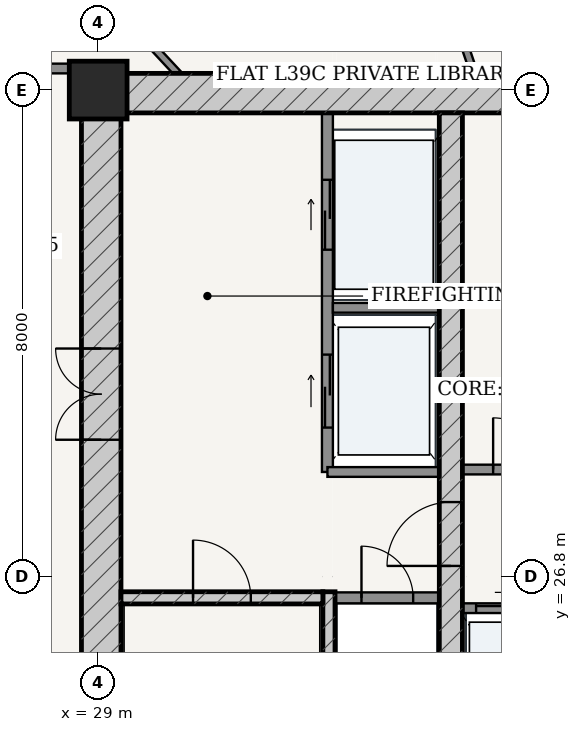
"""IFC4 building model, lengths in metres.
Left out: names, types, materials, properties, quantities, classifications, styles, units other than length and angle.
Written with IfcOpenShell. Run it as: python <this file> out.ifc"""

import sys

from ifc_helpers import new_model, si_unit, direction, frame, frame_2d, origin, origin_2d, place, context, subcontext, project, spatial, rectangle, extrude, source, transform, mapped, element, fill, save


model = new_model("IFC4")
c1 = context("Model", 3, precision=1e-05, world=origin(), true_north=direction((-0.2419218956, 0.970295726276)))
c2 = subcontext(c1, "Body", "Model", "MODEL_VIEW")
j1 = project(units=[si_unit("LENGTHUNIT", "METRE"), si_unit("PLANEANGLEUNIT", "RADIAN")], contexts=[c1])
p1 = place(None, origin())
s1 = spatial("IfcSite", under=j1, at=p1, CompositionType="ELEMENT")
p2 = place(p1, origin())
s2 = spatial("IfcBuilding", under=s1, at=p2, CompositionType="ELEMENT")
p3 = place(p2, frame((0.0, 0.0, 149.8)))
s3 = spatial("IfcBuildingStorey", under=s2, at=p3, CompositionType="ELEMENT", Elevation=149.8)
p4 = place(p3, frame((29.0, 34.8, 0.0), z_axis=(0.0, 0.0, 1.0), x_axis=(1.0, 0.0, 0.0)))
e1 = element("IfcColumn", 1, at=p4, inside=s3, PredefinedType="COLUMN", context=c2, shape_type="SweptSolid", body=[
    extrude(rectangle(XDim=0.95, YDim=0.95, at=origin_2d()), origin(), (0.0, 0.0, 1.0), 3.6),
])
p5 = place(p3, frame((28.725, 34.75, 0.0), z_axis=(0.0, 0.0, 1.0), x_axis=(1.0, 0.0, 0.0)))
e2 = element("IfcWall", 2, at=p5, inside=s3, PredefinedType="SHEAR", context=c2, shape_type="SweptSolid", body=[
    extrude(rectangle(XDim=18.55, YDim=0.65, at=frame_2d((9.275, 0.0))), origin(), (0.0, 0.0, 1.0), 3.33),
])
p6 = place(p3, frame((29.05, 19.175, 0.0), z_axis=(0.0, 0.0, 1.0), x_axis=(0.0, 1.0, 0.0)))
e3 = element("IfcWall", 3, at=p6, inside=s3, PredefinedType="SHEAR", context=c2, shape_type="SweptSolid", body=[
    extrude(rectangle(XDim=15.25, YDim=0.65, at=frame_2d((7.625, 0.0))), origin(), (0.0, 0.0, 1.0), 3.33),
])
p7 = place(p6, frame((9.875, 0.0, 0.0)))
e4 = element("IfcOpeningElement", 4, at=p7, cuts=e3, PredefinedType="OPENING", context=c2, shape_type="SweptSolid", body=[
    extrude(rectangle(XDim=1.5, YDim=2.2, at=frame_2d((0.75, 1.1))), frame((0.0, 0.335, 0.0), z_axis=(0.0, -1.0, 0.0), x_axis=(1.0, 0.0, 0.0)), (0.0, 0.0, 1.0), 0.67),
])
p8 = place(p3, frame((32.795, 19.175, 0.0), z_axis=(0.0, 0.0, 1.0), x_axis=(0.0, 1.0, 0.0)))
e5 = element("IfcWall", 5, at=p8, inside=s3, PredefinedType="SOLIDWALL", context=c2, shape_type="SweptSolid", body=[
    extrude(rectangle(XDim=7.375, YDim=0.2, at=frame_2d((3.688, 0.0))), origin(), (0.0, 0.0, 1.0), 3.33),
])
p9 = place(p3, frame((29.375, 26.45, 0.0), z_axis=(0.0, 0.0, 1.0), x_axis=(1.0, 0.0, 0.0)))
e6 = element("IfcWall", 6, at=p9, inside=s3, PredefinedType="SOLIDWALL", context=c2, shape_type="SweptSolid", body=[
    extrude(rectangle(XDim=3.32, YDim=0.2, at=frame_2d((1.66, 0.0))), origin(), (0.0, 0.0, 1.0), 3.33),
])
p10 = place(p9, frame((1.185, 0.0, 0.0)))
e7 = element("IfcOpeningElement", 7, at=p10, cuts=e6, PredefinedType="OPENING", context=c2, shape_type="SweptSolid", body=[
    extrude(rectangle(XDim=0.95, YDim=2.15, at=frame_2d((0.475, 1.075))), frame((0.0, 0.11, 0.0), z_axis=(0.0, -1.0, 0.0), x_axis=(1.0, 0.0, 0.0)), (0.0, 0.0, 1.0), 0.22),
])
p11 = place(p3, frame((34.8, 19.175, 0.0), z_axis=(0.0, 0.0, 1.0), x_axis=(0.0, 1.0, 0.0)))
e8 = element("IfcWall", 8, at=p11, inside=s3, PredefinedType="SHEAR", context=c2, shape_type="SweptSolid", body=[
    extrude(rectangle(XDim=15.25, YDim=0.38, at=frame_2d((7.625, 0.0))), origin(), (0.0, 0.0, 1.0), 3.33),
])
p12 = place(p11, frame((7.8, 0.0, 0.0)))
e9 = element("IfcOpeningElement", 9, at=p12, cuts=e8, PredefinedType="OPENING", context=c2, shape_type="SweptSolid", body=[
    extrude(rectangle(XDim=1.05, YDim=2.15, at=frame_2d((0.525, 1.075))), frame((0.0, 0.2, 0.0), z_axis=(0.0, -1.0, 0.0), x_axis=(1.0, 0.0, 0.0)), (0.0, 0.0, 1.0), 0.4),
])
p13 = place(p3, frame((32.9, 26.45, 0.0), z_axis=(0.0, 0.0, 1.0), x_axis=(1.0, 0.0, 0.0)))
e10 = element("IfcWall", 10, at=p13, inside=s3, PredefinedType="PARTITIONING", context=c2, shape_type="SweptSolid", body=[
    extrude(rectangle(XDim=1.71, YDim=0.18, at=frame_2d((0.855, 0.0))), origin(), (0.0, 0.0, 1.0), 3.33),
])
p14 = place(p13, frame((0.43, 0.0, 0.0)))
e11 = element("IfcOpeningElement", 11, at=p14, cuts=e10, PredefinedType="OPENING", context=c2, shape_type="SweptSolid", body=[
    extrude(rectangle(XDim=0.85, YDim=2.1, at=frame_2d((0.425, 1.05))), frame((0.0, 0.1, 0.0), z_axis=(0.0, -1.0, 0.0), x_axis=(1.0, 0.0, 0.0)), (0.0, 0.0, 1.0), 0.2),
])
p15 = place(p3, frame((32.77, 28.52, 0.0), z_axis=(0.0, 0.0, 1.0), x_axis=(0.0, 1.0, 0.0)))
e12 = element("IfcWall", 12, at=p15, inside=s3, PredefinedType="PARTITIONING", context=c2, shape_type="SweptSolid", body=[
    extrude(rectangle(XDim=5.905, YDim=0.18, at=frame_2d((2.953, 0.0))), origin(), (0.0, 0.0, 1.0), 3.33),
])
p16 = place(p15, frame((3.655, 0.0, 0.0)))
e13 = element("IfcOpeningElement", 13, at=p16, cuts=e12, PredefinedType="OPENING", context=c2, shape_type="SweptSolid", body=[
    extrude(rectangle(XDim=1.15, YDim=2.2, at=frame_2d((0.575, 1.1))), frame((0.0, 0.1, 0.0), z_axis=(0.0, -1.0, 0.0), x_axis=(1.0, 0.0, 0.0)), (0.0, 0.0, 1.0), 0.2),
])
p17 = place(p15, frame((0.73, 0.0, 0.0)))
e14 = element("IfcOpeningElement", 14, at=p17, cuts=e12, PredefinedType="OPENING", context=c2, shape_type="SweptSolid", body=[
    extrude(rectangle(XDim=1.2, YDim=2.25, at=frame_2d((0.6, 1.125))), frame((0.0, 0.1, 0.0), z_axis=(0.0, -1.0, 0.0), x_axis=(1.0, 0.0, 0.0)), (0.0, 0.0, 1.0), 0.2),
])
p18 = place(p3, frame((32.86, 31.22, 0.0), z_axis=(0.0, 0.0, 1.0), x_axis=(1.0, 0.0, 0.0)))
e15 = element("IfcWall", 15, at=p18, inside=s3, PredefinedType="PARTITIONING", context=c2, shape_type="SweptSolid", body=[
    extrude(rectangle(XDim=1.75, YDim=0.16, at=frame_2d((0.875, 0.0))), origin(), (0.0, 0.0, 1.0), 3.33),
])
p19 = place(p3, frame((32.77, 28.52, 0.0), z_axis=(0.0, 0.0, 1.0), x_axis=(1.0, 0.0, 0.0)))
e16 = element("IfcWall", 16, at=p19, inside=s3, PredefinedType="PARTITIONING", context=c2, shape_type="SweptSolid", body=[
    extrude(rectangle(XDim=1.84, YDim=0.16, at=frame_2d((0.92, 0.0))), origin(), (0.0, 0.0, 1.0), 3.33),
])
p20 = place(p3, frame((34.99, 28.56, 0.0), z_axis=(0.0, 0.0, 1.0), x_axis=(1.0, 0.0, 0.0)))
e17 = element("IfcWall", 17, at=p20, inside=s3, PredefinedType="PARTITIONING", context=c2, shape_type="SweptSolid", body=[
    extrude(rectangle(XDim=6.02, YDim=0.16, at=frame_2d((3.01, 0.0))), origin(), (0.0, 0.0, 1.0), 3.33),
])
p21 = place(p20, frame((0.505, 0.0, 0.0)))
e18 = element("IfcOpeningElement", 18, at=p21, cuts=e17, PredefinedType="OPENING", context=c2, shape_type="SweptSolid", body=[
    extrude(rectangle(XDim=0.85, YDim=2.1, at=frame_2d((0.425, 1.05))), frame((0.0, 0.09, 0.0), z_axis=(0.0, -1.0, 0.0), x_axis=(1.0, 0.0, 0.0)), (0.0, 0.0, 1.0), 0.18),
])
p22 = place(p20, frame((2.58, 0.0, 0.0)))
e19 = element("IfcOpeningElement", 19, at=p22, cuts=e17, PredefinedType="OPENING", context=c2, shape_type="SweptSolid", body=[
    extrude(rectangle(XDim=0.86, YDim=2.1, at=frame_2d((0.43, 1.05))), frame((0.0, 0.09, 0.0), z_axis=(0.0, -1.0, 0.0), x_axis=(1.0, 0.0, 0.0)), (0.0, 0.0, 1.0), 0.18),
])
p23 = place(p20, frame((4.665, 0.0, 0.0)))
e20 = element("IfcOpeningElement", 20, at=p23, cuts=e17, PredefinedType="OPENING", context=c2, shape_type="SweptSolid", body=[
    extrude(rectangle(XDim=0.85, YDim=2.1, at=frame_2d((0.425, 1.05))), frame((0.0, 0.09, 0.0), z_axis=(0.0, -1.0, 0.0), x_axis=(1.0, 0.0, 0.0)), (0.0, 0.0, 1.0), 0.18),
])
p24 = place(p3, frame((34.99, 26.28, 0.0), z_axis=(0.0, 0.0, 1.0), x_axis=(1.0, 0.0, 0.0)))
e21 = element("IfcWall", 21, at=p24, inside=s3, PredefinedType="PARTITIONING", context=c2, shape_type="SweptSolid", body=[
    extrude(rectangle(XDim=6.02, YDim=0.16, at=frame_2d((3.01, 0.0))), origin(), (0.0, 0.0, 1.0), 3.33),
])
p25 = place(p24, frame((0.225, 0.0, 0.0)))
e22 = element("IfcOpeningElement", 22, at=p25, cuts=e21, PredefinedType="OPENING", context=c2, shape_type="SweptSolid", body=[
    extrude(rectangle(XDim=1.1, YDim=2.2, at=frame_2d((0.55, 1.1))), frame((0.0, 0.09, 0.0), z_axis=(0.0, -1.0, 0.0), x_axis=(1.0, 0.0, 0.0)), (0.0, 0.0, 1.0), 0.18),
])
p26 = place(p24, frame((1.705, 0.0, 0.0)))
e23 = element("IfcOpeningElement", 23, at=p26, cuts=e21, PredefinedType="OPENING", context=c2, shape_type="SweptSolid", body=[
    extrude(rectangle(XDim=1.1, YDim=2.2, at=frame_2d((0.55, 1.1))), frame((0.0, 0.09, 0.0), z_axis=(0.0, -1.0, 0.0), x_axis=(1.0, 0.0, 0.0)), (0.0, 0.0, 1.0), 0.18),
])
p27 = place(p3, frame((26.795, 35.155, 0.0), z_axis=(0.0, 0.0, 1.0), x_axis=(1.0, 0.0, 0.0)))
e24 = element("IfcWall", 24, at=p27, inside=s3, PredefinedType="PARTITIONING", context=c2, shape_type="SweptSolid", body=[
    extrude(rectangle(XDim=1.93, YDim=0.16, at=frame_2d((0.965, 0.0))), origin(), (0.0, 0.0, 1.0), 2.776),
])
p28 = place(p3, frame((35.182, 35.075, 0.0), z_axis=(0.0, 0.0, 1.0), x_axis=(-0.322321614946, 0.946630221649, 0.0)))
e25 = element("IfcWall", 25, at=p28, inside=s3, PredefinedType="PARTITIONING", context=c2, shape_type="SweptSolid", body=[
    extrude(rectangle(XDim=2.737, YDim=0.12, at=frame_2d((1.369, 0.0))), origin(), (0.0, 0.0, 1.0), 2.415),
])
p29 = place(p3, frame((30.307, 35.075, 0.0), z_axis=(0.0, 0.0, 1.0), x_axis=(-0.68082810609, 0.732443233267, 0.0)))
e26 = element("IfcWall", 26, at=p29, inside=s3, PredefinedType="PARTITIONING", context=c2, shape_type="SweptSolid", body=[
    extrude(rectangle(XDim=3.775, YDim=0.12, at=frame_2d((1.887, 0.0))), origin(), (0.0, 0.0, 1.0), 2.776),
])
m1 = source(origin(), c2, "Body", "SweptSolid", [
    extrude(rectangle(XDim=1.5, YDim=2.2, at=frame_2d((0.75, 1.1))), frame((0.0, 0.025, 0.0), z_axis=(0.0, -1.0, 0.0), x_axis=(1.0, 0.0, 0.0)), (0.0, 0.0, 1.0), 0.05),
])
p30 = place(p7, origin())
e27 = element("IfcDoor", 27, at=p30, inside=s3, OperationType="DOUBLE_DOOR_SINGLE_SWING", PredefinedType="DOOR", context=c2, shape_type="MappedRepresentation", body=[
    mapped(m1, transform((0.0, 0.0, 0.0), scale=1.0)),
])
fill(e4, e27)
m2 = source(origin(), c2, "Body", "SweptSolid", [
    extrude(rectangle(XDim=1.05, YDim=2.15, at=frame_2d((0.525, 1.075))), frame((0.0, 0.025, 0.0), z_axis=(0.0, -1.0, 0.0), x_axis=(1.0, 0.0, 0.0)), (0.0, 0.0, 1.0), 0.05),
])
p31 = place(p12, origin())
e28 = element("IfcDoor", 28, at=p31, inside=s3, OperationType="SINGLE_SWING_LEFT", PredefinedType="DOOR", context=c2, shape_type="MappedRepresentation", body=[
    mapped(m2, transform((0.0, 0.0, 0.0), scale=1.0)),
])
fill(e9, e28)
m3 = source(origin(), c2, "Body", "SweptSolid", [
    extrude(rectangle(XDim=0.95, YDim=2.15, at=frame_2d((0.475, 1.075))), frame((0.0, 0.025, 0.0), z_axis=(0.0, -1.0, 0.0), x_axis=(1.0, 0.0, 0.0)), (0.0, 0.0, 1.0), 0.05),
])
p32 = place(p10, origin())
e29 = element("IfcDoor", 29, at=p32, inside=s3, OperationType="SINGLE_SWING_LEFT", PredefinedType="DOOR", context=c2, shape_type="MappedRepresentation", body=[
    mapped(m3, transform((0.0, 0.0, 0.0), scale=1.0)),
])
fill(e7, e29)
m4 = source(origin(), c2, "Body", "SweptSolid", [
    extrude(rectangle(XDim=0.85, YDim=2.1, at=frame_2d((0.425, 1.05))), frame((0.0, 0.025, 0.0), z_axis=(0.0, -1.0, 0.0), x_axis=(1.0, 0.0, 0.0)), (0.0, 0.0, 1.0), 0.05),
])
p33 = place(p14, origin())
e30 = element("IfcDoor", 30, at=p33, inside=s3, OperationType="SINGLE_SWING_LEFT", PredefinedType="DOOR", context=c2, shape_type="MappedRepresentation", body=[
    mapped(m4, transform((0.0, 0.0, 0.0), scale=1.0)),
])
fill(e11, e30)
p34 = place(p21, origin())
e31 = element("IfcDoor", 31, at=p34, inside=s3, OperationType="SINGLE_SWING_LEFT", PredefinedType="DOOR", context=c2, shape_type="MappedRepresentation", body=[
    mapped(m4, transform((0.0, 0.0, 0.0), scale=1.0)),
])
fill(e18, e31)
m5 = source(origin(), c2, "Body", "SweptSolid", [
    extrude(rectangle(XDim=1.15, YDim=2.2, at=frame_2d((0.575, 1.1))), frame((0.0, 0.025, 0.0), z_axis=(0.0, -1.0, 0.0), x_axis=(1.0, 0.0, 0.0)), (0.0, 0.0, 1.0), 0.05),
])
p35 = place(p16, origin())
e32 = element("IfcDoor", 32, at=p35, inside=s3, OperationType="DOUBLE_DOOR_SLIDING", PredefinedType="DOOR", context=c2, shape_type="MappedRepresentation", body=[
    mapped(m5, transform((0.0, 0.0, 0.0), scale=1.0)),
])
fill(e13, e32)
m6 = source(origin(), c2, "Body", "SweptSolid", [
    extrude(rectangle(XDim=1.2, YDim=2.25, at=frame_2d((0.6, 1.125))), frame((0.0, 0.025, 0.0), z_axis=(0.0, -1.0, 0.0), x_axis=(1.0, 0.0, 0.0)), (0.0, 0.0, 1.0), 0.05),
])
p36 = place(p17, origin())
e33 = element("IfcDoor", 33, at=p36, inside=s3, OperationType="DOUBLE_DOOR_SLIDING", PredefinedType="DOOR", context=c2, shape_type="MappedRepresentation", body=[
    mapped(m6, transform((0.0, 0.0, 0.0), scale=1.0)),
])
fill(e14, e33)
m7 = source(origin(), c2, "Body", "SweptSolid", [
    extrude(rectangle(XDim=1.1, YDim=2.2, at=frame_2d((0.55, 1.1))), frame((0.0, 0.025, 0.0), z_axis=(0.0, -1.0, 0.0), x_axis=(1.0, 0.0, 0.0)), (0.0, 0.0, 1.0), 0.05),
])
p37 = place(p25, origin())
e34 = element("IfcDoor", 34, at=p37, inside=s3, OperationType="DOUBLE_DOOR_SLIDING", PredefinedType="DOOR", context=c2, shape_type="MappedRepresentation", body=[
    mapped(m7, transform((0.0, 0.0, 0.0), scale=1.0)),
])
fill(e22, e34)
save(model, sys.argv[1])
